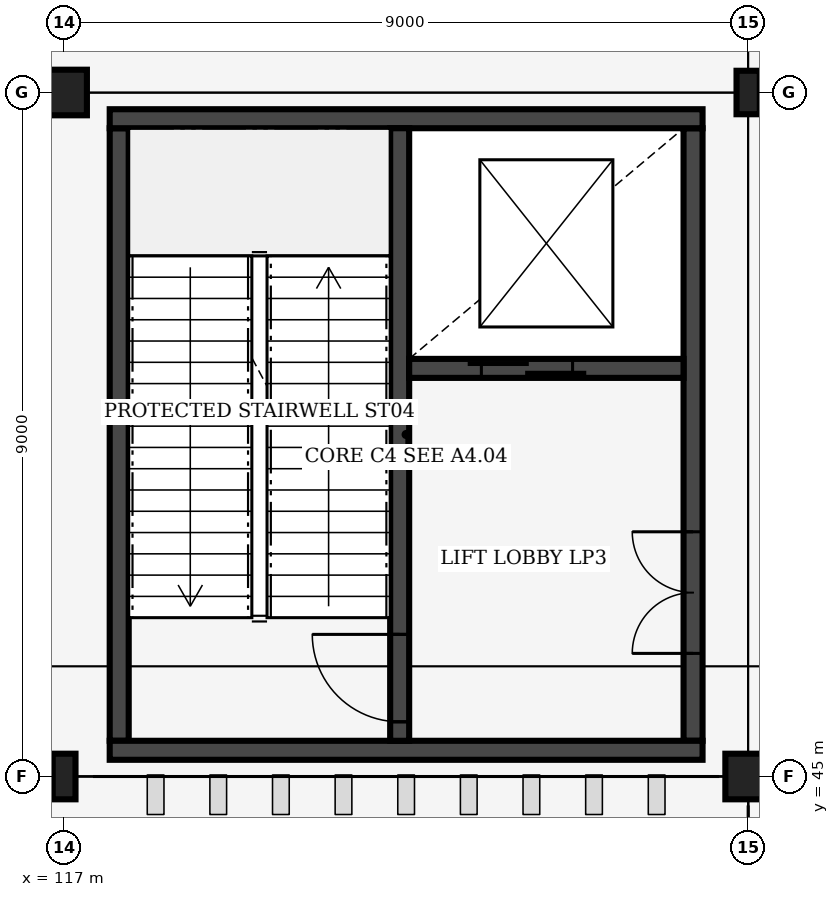
"""IFC4 building model, lengths in metres.
Left out: names, types, materials, properties, quantities, classifications, styles, units other than length and angle.
Written with IfcOpenShell. Run it as: python <this file> out.ifc"""

import sys

from ifc_helpers import new_model, si_unit, direction, frame, frame_2d, origin, origin_2d, place, context, subcontext, project, spatial, rectangle, i_section, extrude, element, fill, save


model = new_model("IFC4")
c1 = context("Model", 3, precision=1e-05, world=origin(), true_north=direction((0.0, 1.0)))
c2 = subcontext(c1, "Body", "Model", "MODEL_VIEW")
j1 = project(units=[si_unit("LENGTHUNIT", "METRE"), si_unit("PLANEANGLEUNIT", "RADIAN")], contexts=[c1])
p1 = place(None, origin())
s1 = spatial("IfcSite", under=j1, at=p1, CompositionType="ELEMENT")
p2 = place(p1, origin())
s2 = spatial("IfcBuilding", under=s1, at=p2, CompositionType="ELEMENT")
p3 = place(p2, frame((0.0, 0.0, 6.0)))
s3 = spatial("IfcBuildingStorey", under=s2, at=p3, CompositionType="ELEMENT", Elevation=6.0)
p4 = place(p3, frame((117.0, 45.0, 0.0), z_axis=(0.0, 0.0, 1.0), x_axis=(1.0, 0.0, 0.0)))
e1 = element("IfcColumn", 1, at=p4, inside=s3, PredefinedType="COLUMN", context=c2, shape_type="SweptSolid", body=[
    extrude(i_section(OverallWidth=0.3, OverallDepth=0.6, WebThickness=0.015, FlangeThickness=0.03, FilletRadius=0.027, at=origin_2d()), origin(), (0.0, 0.0, 1.0), 6.0),
])
for number, where, z_axis, x_axis in (
    (2, (117.0, 54.0, 0.0), (0.0, 0.0, 1.0), (1.0, 0.0, 0.0)),
    (3, (126.0, 45.0, 0.0), (0.0, 0.0, 1.0), (1.0, 0.0, 0.0)),
):
    element("IfcColumn", number, at=place(p3, frame(where, z_axis=z_axis, x_axis=x_axis)), inside=s3, PredefinedType="COLUMN", context=c2, shape_type="SweptSolid", body=[
        extrude(rectangle(XDim=0.6, YDim=0.6, at=origin_2d()), origin(), (0.0, 0.0, 1.0), 6.0),
    ])
p5 = place(p3, frame((126.0, 54.0, 0.0), z_axis=(0.0, 0.0, 1.0), x_axis=(1.0, 0.0, 0.0)))
e4 = element("IfcColumn", 4, at=p5, inside=s3, PredefinedType="COLUMN", context=c2, shape_type="SweptSolid", body=[
    extrude(i_section(OverallWidth=0.306, OverallDepth=0.572, WebThickness=0.021, FlangeThickness=0.04, FilletRadius=0.027, at=origin_2d()), origin(), (0.0, 0.0, 1.0), 6.0),
])
p6 = place(p3, frame((117.725, 45.47, 0.0), z_axis=(0.0, 0.0, 1.0), x_axis=(0.0, 1.0, 0.0)))
e5 = element("IfcWall", 5, at=p6, inside=s3, PredefinedType="SHEAR", context=c2, shape_type="SweptSolid", body=[
    extrude(rectangle(XDim=8.06, YDim=0.25, at=frame_2d((4.03, 0.0))), origin(), (0.0, 0.0, 1.0), 5.71),
])
p7 = place(p3, frame((125.275, 45.47, 0.0), z_axis=(0.0, 0.0, 1.0), x_axis=(0.0, 1.0, 0.0)))
e6 = element("IfcWall", 6, at=p7, inside=s3, PredefinedType="SHEAR", context=c2, shape_type="SweptSolid", body=[
    extrude(rectangle(XDim=8.06, YDim=0.25, at=frame_2d((4.03, 0.0))), origin(), (0.0, 0.0, 1.0), 5.71),
])
p8 = place(p7, frame((1.15, 0.0, 0.0)))
e7 = element("IfcOpeningElement", 7, at=p8, cuts=e6, PredefinedType="OPENING", context=c2, shape_type="SweptSolid", body=[
    extrude(rectangle(XDim=1.6, YDim=2.2, at=frame_2d((0.8, 1.1))), frame((0.0, 0.135, 0.0), z_axis=(0.0, -1.0, 0.0), x_axis=(1.0, 0.0, 0.0)), (0.0, 0.0, 1.0), 0.27),
])
for number, where, z_axis, x_axis in (
    (8, (117.6, 45.345, 0.0), (0.0, 0.0, 1.0), (1.0, 0.0, 0.0)),
    (9, (117.6, 53.655, 0.0), (0.0, 0.0, 1.0), (1.0, 0.0, 0.0)),
):
    element("IfcWall", number, at=place(p3, frame(where, z_axis=z_axis, x_axis=x_axis)), inside=s3, PredefinedType="SHEAR", context=c2, shape_type="SweptSolid", body=[
        extrude(rectangle(XDim=7.8, YDim=0.25, at=frame_2d((3.9, 0.0))), origin(), (0.0, 0.0, 1.0), 5.71),
    ])
p9 = place(p3, frame((121.415, 45.47, 0.0), z_axis=(0.0, 0.0, 1.0), x_axis=(0.0, 1.0, 0.0)))
e10 = element("IfcWall", 10, at=p9, inside=s3, PredefinedType="SHEAR", context=c2, shape_type="SweptSolid", body=[
    extrude(rectangle(XDim=8.06, YDim=0.25, at=frame_2d((4.03, 0.0))), origin(), (0.0, 0.0, 1.0), 5.71),
])
p10 = place(p9, frame((0.25, 0.0, 0.0)))
e11 = element("IfcOpeningElement", 11, at=p10, cuts=e10, PredefinedType="OPENING", context=c2, shape_type="SweptSolid", body=[
    extrude(rectangle(XDim=1.15, YDim=2.15, at=frame_2d((0.575, 1.075))), frame((0.0, 0.135, 0.0), z_axis=(0.0, -1.0, 0.0), x_axis=(1.0, 0.0, 0.0)), (0.0, 0.0, 1.0), 0.27),
])
p11 = place(p3, frame((121.54, 50.37, 0.0), z_axis=(0.0, 0.0, 1.0), x_axis=(1.0, 0.0, 0.0)))
e12 = element("IfcWall", 12, at=p11, inside=s3, PredefinedType="SHEAR", context=c2, shape_type="SweptSolid", body=[
    extrude(rectangle(XDim=3.61, YDim=0.25, at=frame_2d((1.805, 0.0))), origin(), (0.0, 0.0, 1.0), 5.71),
])
p12 = place(p11, frame((0.95, 0.0, 0.0)))
e13 = element("IfcOpeningElement", 13, at=p12, cuts=e12, PredefinedType="OPENING", context=c2, shape_type="SweptSolid", body=[
    extrude(rectangle(XDim=1.2, YDim=2.2, at=frame_2d((0.6, 1.1))), frame((0.0, 0.135, 0.0), z_axis=(0.0, -1.0, 0.0), x_axis=(1.0, 0.0, 0.0)), (0.0, 0.0, 1.0), 0.27),
])
p13 = place(p10, origin())
e14 = element("IfcDoor", 14, at=p13, inside=s3, OperationType="SINGLE_SWING_RIGHT", PredefinedType="DOOR", context=c2, shape_type="SweptSolid", body=[
    extrude(rectangle(XDim=1.15, YDim=2.15, at=frame_2d((0.575, 1.075))), frame((0.0, 0.025, 0.0), z_axis=(0.0, -1.0, 0.0), x_axis=(1.0, 0.0, 0.0)), (0.0, 0.0, 1.0), 0.05),
])
fill(e11, e14)
p14 = place(p12, origin())
e15 = element("IfcDoor", 15, at=p14, inside=s3, OperationType="DOUBLE_DOOR_SLIDING", PredefinedType="DOOR", context=c2, shape_type="SweptSolid", body=[
    extrude(rectangle(XDim=1.2, YDim=2.2, at=frame_2d((0.6, 1.1))), frame((0.0, 0.025, 0.0), z_axis=(0.0, -1.0, 0.0), x_axis=(1.0, 0.0, 0.0)), (0.0, 0.0, 1.0), 0.05),
])
fill(e13, e15)
p15 = place(p8, origin())
e16 = element("IfcDoor", 16, at=p15, inside=s3, OperationType="DOUBLE_DOOR_SINGLE_SWING", PredefinedType="DOOR", context=c2, shape_type="SweptSolid", body=[
    extrude(rectangle(XDim=1.6, YDim=2.2, at=frame_2d((0.8, 1.1))), frame((0.0, 0.025, 0.0), z_axis=(0.0, -1.0, 0.0), x_axis=(1.0, 0.0, 0.0)), (0.0, 0.0, 1.0), 0.05),
])
fill(e7, e16)
save(model, sys.argv[1])
